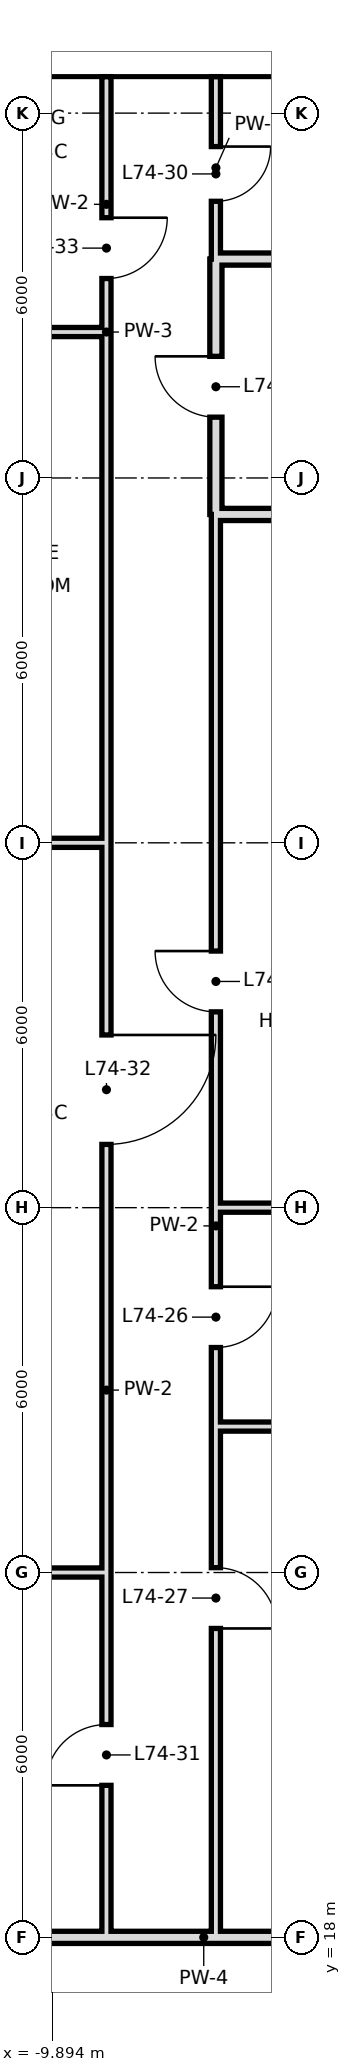
"""IFC4 building model, lengths in metres.
Left out: names, types, materials, properties, quantities, classifications, styles, units other than length and angle.
Written with IfcOpenShell. Run it as: python <this file> out.ifc"""

import sys

from ifc_helpers import new_model, si_unit, direction, frame, frame_2d, origin, place, context, subcontext, project, spatial, rectangle, extrude, element, fill, save


model = new_model("IFC4")
c1 = context("Model", 3, precision=1e-05, world=origin(), true_north=direction((0.0, 1.0)))
c2 = subcontext(c1, "Body", "Model", "MODEL_VIEW")
j1 = project(units=[si_unit("LENGTHUNIT", "METRE"), si_unit("PLANEANGLEUNIT", "RADIAN")], contexts=[c1])
p1 = place(None, origin())
s1 = spatial("IfcSite", under=j1, at=p1, CompositionType="ELEMENT")
p2 = place(p1, origin())
s2 = spatial("IfcBuilding", under=s1, at=p2, CompositionType="ELEMENT")
p3 = place(p2, frame((0.0, 0.0, 312.4)))
s3 = spatial("IfcBuildingStorey", under=s2, at=p3, CompositionType="ELEMENT", Elevation=312.4)
p4 = place(p3, frame((-7.2, 41.4, 0.0), z_axis=(0.0, 0.0, 1.0), x_axis=(0.0, 1.0, 0.0)))
e1 = element("IfcWall", 1, at=p4, inside=s3, PredefinedType="SOLIDWALL", context=c2, shape_type="SweptSolid", body=[
    extrude(rectangle(XDim=4.2, YDim=0.2, at=frame_2d((2.1, 0.0))), origin(), (0.0, 0.0, 1.0), 2.72),
])
p5 = place(p4, frame((1.6, 0.0, 0.0)))
e2 = element("IfcOpeningElement", 2, at=p5, cuts=e1, PredefinedType="OPENING", context=c2, shape_type="SweptSolid", body=[
    extrude(rectangle(XDim=1.0, YDim=2.4, at=frame_2d((0.5, 1.2))), frame((0.0, 0.11, 0.0), z_axis=(0.0, -1.0, 0.0), x_axis=(1.0, 0.0, 0.0)), (0.0, 0.0, 1.0), 0.22),
])
p6 = place(p3, frame((-7.2, 18.0, 0.0), z_axis=(0.0, 0.0, 1.0), x_axis=(0.0, 1.0, 0.0)))
e3 = element("IfcWall", 3, at=p6, inside=s3, PredefinedType="PARTITIONING", context=c2, shape_type="SweptSolid", body=[
    extrude(rectangle(XDim=23.4, YDim=0.15, at=frame_2d((11.7, 0.0))), origin(), (0.0, 0.0, 1.0), 3.42),
])
p7 = place(p6, frame((9.7, 0.0, 0.0)))
e4 = element("IfcOpeningElement", 4, at=p7, cuts=e3, PredefinedType="OPENING", context=c2, shape_type="SweptSolid", body=[
    extrude(rectangle(XDim=1.0, YDim=2.4, at=frame_2d((0.5, 1.2))), frame((0.0, 0.085, 0.0), z_axis=(0.0, -1.0, 0.0), x_axis=(1.0, 0.0, 0.0)), (0.0, 0.0, 1.0), 0.17),
])
p8 = place(p6, frame((5.08, 0.0, 0.0)))
e5 = element("IfcOpeningElement", 5, at=p8, cuts=e3, PredefinedType="OPENING", context=c2, shape_type="SweptSolid", body=[
    extrude(rectangle(XDim=1.0, YDim=2.4, at=frame_2d((0.5, 1.2))), frame((0.0, 0.085, 0.0), z_axis=(0.0, -1.0, 0.0), x_axis=(1.0, 0.0, 0.0)), (0.0, 0.0, 1.0), 0.17),
])
p9 = place(p6, frame((15.22, 0.0, 0.0)))
e6 = element("IfcOpeningElement", 6, at=p9, cuts=e3, PredefinedType="OPENING", context=c2, shape_type="SweptSolid", body=[
    extrude(rectangle(XDim=1.0, YDim=2.4, at=frame_2d((0.5, 1.2))), frame((0.0, 0.085, 0.0), z_axis=(0.0, -1.0, 0.0), x_axis=(1.0, 0.0, 0.0)), (0.0, 0.0, 1.0), 0.17),
])
p10 = place(p3, frame((-7.2, 45.6, 0.0), z_axis=(0.0, 0.0, 1.0), x_axis=(0.0, 1.0, 0.0)))
e7 = element("IfcWall", 7, at=p10, inside=s3, PredefinedType="PARTITIONING", context=c2, shape_type="SweptSolid", body=[
    extrude(rectangle(XDim=3.0, YDim=0.15, at=frame_2d((1.5, 0.0))), origin(), (0.0, 0.0, 1.0), 3.42),
])
p11 = place(p10, frame((0.95, 0.0, 0.0)))
e8 = element("IfcOpeningElement", 8, at=p11, cuts=e7, PredefinedType="OPENING", context=c2, shape_type="SweptSolid", body=[
    extrude(rectangle(XDim=0.9, YDim=2.4, at=frame_2d((0.45, 1.2))), frame((0.0, 0.085, 0.0), z_axis=(0.0, -1.0, 0.0), x_axis=(1.0, 0.0, 0.0)), (0.0, 0.0, 1.0), 0.17),
])
p12 = place(p3, frame((-9.0, 18.0, 0.0), z_axis=(0.0, 0.0, 1.0), x_axis=(0.0, 1.0, 0.0)))
e9 = element("IfcWall", 9, at=p12, inside=s3, PredefinedType="PARTITIONING", context=c2, shape_type="SweptSolid", body=[
    extrude(rectangle(XDim=18.0, YDim=0.15, at=frame_2d((9.0, 0.0))), origin(), (0.0, 0.0, 1.0), 3.42),
])
p13 = place(p12, frame((2.5, 0.0, 0.0)))
e10 = element("IfcOpeningElement", 10, at=p13, cuts=e9, PredefinedType="OPENING", context=c2, shape_type="SweptSolid", body=[
    extrude(rectangle(XDim=1.0, YDim=2.4, at=frame_2d((0.5, 1.2))), frame((0.0, 0.085, 0.0), z_axis=(0.0, -1.0, 0.0), x_axis=(1.0, 0.0, 0.0)), (0.0, 0.0, 1.0), 0.17),
])
p14 = place(p12, frame((13.04, 0.0, 0.0)))
e11 = element("IfcOpeningElement", 11, at=p14, cuts=e9, PredefinedType="OPENING", context=c2, shape_type="SweptSolid", body=[
    extrude(rectangle(XDim=1.8, YDim=2.4, at=frame_2d((0.9, 1.2))), frame((0.0, 0.085, 0.0), z_axis=(0.0, -1.0, 0.0), x_axis=(1.0, 0.0, 0.0)), (0.0, 0.0, 1.0), 0.17),
])
p15 = place(p3, frame((-9.0, 44.4, 0.0), z_axis=(0.0, 0.0, 1.0), x_axis=(0.0, 1.0, 0.0)))
e12 = element("IfcWall", 12, at=p15, inside=s3, PredefinedType="PARTITIONING", context=c2, shape_type="SweptSolid", body=[
    extrude(rectangle(XDim=4.2, YDim=0.15, at=frame_2d((2.1, 0.0))), origin(), (0.0, 0.0, 1.0), 3.42),
])
p16 = place(p15, frame((0.88, 0.0, 0.0)))
e13 = element("IfcOpeningElement", 13, at=p16, cuts=e12, PredefinedType="OPENING", context=c2, shape_type="SweptSolid", body=[
    extrude(rectangle(XDim=1.0, YDim=2.4, at=frame_2d((0.5, 1.2))), frame((0.0, 0.085, 0.0), z_axis=(0.0, -1.0, 0.0), x_axis=(1.0, 0.0, 0.0)), (0.0, 0.0, 1.0), 0.17),
])
p17 = place(p3, frame((-9.0, 36.0, 0.0), z_axis=(0.0, 0.0, 1.0), x_axis=(0.0, 1.0, 0.0)))
e14 = element("IfcWall", 14, at=p17, inside=s3, PredefinedType="PARTITIONING", context=c2, shape_type="SweptSolid", body=[
    extrude(rectangle(XDim=8.4, YDim=0.15, at=frame_2d((4.2, 0.0))), origin(), (0.0, 0.0, 1.0), 3.42),
])
p18 = place(p3, frame((-18.6, 18.0, 0.0), z_axis=(0.0, 0.0, 1.0), x_axis=(1.0, 0.0, 0.0)))
e15 = element("IfcWall", 15, at=p18, inside=s3, PredefinedType="SOLIDWALL", context=c2, shape_type="SweptSolid", body=[
    extrude(rectangle(XDim=21.7, YDim=0.2, at=frame_2d((10.85, 0.0))), origin(), (0.0, 0.0, 1.0), 2.72),
])
p19 = place(p3, frame((-18.0, 24.0, 0.0), z_axis=(0.0, 0.0, 1.0), x_axis=(1.0, 0.0, 0.0)))
e16 = element("IfcWall", 16, at=p19, inside=s3, PredefinedType="PARTITIONING", context=c2, shape_type="SweptSolid", body=[
    extrude(rectangle(XDim=9.0, YDim=0.15, at=frame_2d((4.5, 0.0))), origin(), (0.0, 0.0, 1.0), 2.72),
])
p20 = place(p3, frame((-7.2, 26.4, 0.0), z_axis=(0.0, 0.0, 1.0), x_axis=(1.0, 0.0, 0.0)))
e17 = element("IfcWall", 17, at=p20, inside=s3, PredefinedType="PARTITIONING", context=c2, shape_type="SweptSolid", body=[
    extrude(rectangle(XDim=10.3, YDim=0.15, at=frame_2d((5.15, 0.0))), origin(), (0.0, 0.0, 1.0), 3.42),
])
p21 = place(p3, frame((-7.2, 30.0, 0.0), z_axis=(0.0, 0.0, 1.0), x_axis=(1.0, 0.0, 0.0)))
e18 = element("IfcWall", 18, at=p21, inside=s3, PredefinedType="PARTITIONING", context=c2, shape_type="SweptSolid", body=[
    extrude(rectangle(XDim=10.3, YDim=0.15, at=frame_2d((5.15, 0.0))), origin(), (0.0, 0.0, 1.0), 2.72),
])
p22 = place(p3, frame((-12.0, 36.0, 0.0), z_axis=(0.0, 0.0, 1.0), x_axis=(1.0, 0.0, 0.0)))
e19 = element("IfcWall", 19, at=p22, inside=s3, PredefinedType="PARTITIONING", context=c2, shape_type="SweptSolid", body=[
    extrude(rectangle(XDim=3.0, YDim=0.15, at=frame_2d((1.5, 0.0))), origin(), (0.0, 0.0, 1.0), 2.72),
])
p23 = place(p3, frame((-7.2, 41.4, 0.0), z_axis=(0.0, 0.0, 1.0), x_axis=(1.0, 0.0, 0.0)))
e20 = element("IfcWall", 20, at=p23, inside=s3, PredefinedType="SOLIDWALL", context=c2, shape_type="SweptSolid", body=[
    extrude(rectangle(XDim=10.3, YDim=0.2, at=frame_2d((5.15, 0.0))), origin(), (0.0, 0.0, 1.0), 2.72),
])
p24 = place(p3, frame((-12.0, 44.4, 0.0), z_axis=(0.0, 0.0, 1.0), x_axis=(1.0, 0.0, 0.0)))
e21 = element("IfcWall", 21, at=p24, inside=s3, PredefinedType="PARTITIONING", context=c2, shape_type="SweptSolid", body=[
    extrude(rectangle(XDim=3.0, YDim=0.15, at=frame_2d((1.5, 0.0))), origin(), (0.0, 0.0, 1.0), 3.42),
])
p25 = place(p3, frame((-7.2, 45.6, 0.0), z_axis=(0.0, 0.0, 1.0), x_axis=(1.0, 0.0, 0.0)))
e22 = element("IfcWall", 22, at=p25, inside=s3, PredefinedType="SOLIDWALL", context=c2, shape_type="SweptSolid", body=[
    extrude(rectangle(XDim=10.3, YDim=0.2, at=frame_2d((5.15, 0.0))), origin(), (0.0, 0.0, 1.0), 2.72),
])
p26 = place(p7, origin())
e23 = element("IfcDoor", 23, at=p26, inside=s3, OperationType="SINGLE_SWING_RIGHT", PredefinedType="DOOR", context=c2, shape_type="SweptSolid", body=[
    extrude(rectangle(XDim=1.0, YDim=2.4, at=frame_2d((0.5, 1.2))), frame((0.0, 0.025, 0.0), z_axis=(0.0, -1.0, 0.0), x_axis=(1.0, 0.0, 0.0)), (0.0, 0.0, 1.0), 0.05),
])
fill(e4, e23)
p27 = place(p8, frame((1.0, 0.0, 0.0), z_axis=(0.0, 0.0, 1.0), x_axis=(-1.0, 0.0, 0.0)))
e24 = element("IfcDoor", 24, at=p27, inside=s3, OperationType="SINGLE_SWING_RIGHT", PredefinedType="DOOR", context=c2, shape_type="SweptSolid", body=[
    extrude(rectangle(XDim=1.0, YDim=2.4, at=frame_2d((0.5, 1.2))), frame((0.0, 0.025, 0.0), z_axis=(0.0, -1.0, 0.0), x_axis=(1.0, 0.0, 0.0)), (0.0, 0.0, 1.0), 0.05),
])
fill(e5, e24)
p28 = place(p9, frame((1.0, 0.0, 0.0), z_axis=(0.0, 0.0, 1.0), x_axis=(-1.0, 0.0, 0.0)))
e25 = element("IfcDoor", 25, at=p28, inside=s3, OperationType="SINGLE_SWING_LEFT", PredefinedType="DOOR", context=c2, shape_type="SweptSolid", body=[
    extrude(rectangle(XDim=1.0, YDim=2.4, at=frame_2d((0.5, 1.2))), frame((0.0, 0.025, 0.0), z_axis=(0.0, -1.0, 0.0), x_axis=(1.0, 0.0, 0.0)), (0.0, 0.0, 1.0), 0.05),
])
fill(e6, e25)
p29 = place(p5, frame((1.0, 0.0, 0.0), z_axis=(0.0, 0.0, 1.0), x_axis=(-1.0, 0.0, 0.0)))
e26 = element("IfcDoor", 26, at=p29, inside=s3, OperationType="SINGLE_SWING_LEFT", PredefinedType="DOOR", context=c2, shape_type="SweptSolid", body=[
    extrude(rectangle(XDim=1.0, YDim=2.4, at=frame_2d((0.5, 1.2))), frame((0.0, 0.025, 0.0), z_axis=(0.0, -1.0, 0.0), x_axis=(1.0, 0.0, 0.0)), (0.0, 0.0, 1.0), 0.05),
])
fill(e2, e26)
p30 = place(p11, origin())
e27 = element("IfcDoor", 27, at=p30, inside=s3, OperationType="SINGLE_SWING_RIGHT", PredefinedType="DOOR", context=c2, shape_type="SweptSolid", body=[
    extrude(rectangle(XDim=0.9, YDim=2.4, at=frame_2d((0.45, 1.2))), frame((0.0, 0.025, 0.0), z_axis=(0.0, -1.0, 0.0), x_axis=(1.0, 0.0, 0.0)), (0.0, 0.0, 1.0), 0.05),
])
fill(e8, e27)
p31 = place(p13, origin())
e28 = element("IfcDoor", 28, at=p31, inside=s3, OperationType="SINGLE_SWING_LEFT", PredefinedType="DOOR", context=c2, shape_type="SweptSolid", body=[
    extrude(rectangle(XDim=1.0, YDim=2.4, at=frame_2d((0.5, 1.2))), frame((0.0, 0.025, 0.0), z_axis=(0.0, -1.0, 0.0), x_axis=(1.0, 0.0, 0.0)), (0.0, 0.0, 1.0), 0.05),
])
fill(e10, e28)
p32 = place(p14, origin())
e29 = element("IfcDoor", 29, at=p32, inside=s3, OperationType="SINGLE_SWING_RIGHT", PredefinedType="DOOR", context=c2, shape_type="SweptSolid", body=[
    extrude(rectangle(XDim=1.8, YDim=2.4, at=frame_2d((0.9, 1.2))), frame((0.0, 0.025, 0.0), z_axis=(0.0, -1.0, 0.0), x_axis=(1.0, 0.0, 0.0)), (0.0, 0.0, 1.0), 0.05),
])
fill(e11, e29)
p33 = place(p16, origin())
e30 = element("IfcDoor", 30, at=p33, inside=s3, OperationType="SINGLE_SWING_RIGHT", PredefinedType="DOOR", context=c2, shape_type="SweptSolid", body=[
    extrude(rectangle(XDim=1.0, YDim=2.4, at=frame_2d((0.5, 1.2))), frame((0.0, 0.025, 0.0), z_axis=(0.0, -1.0, 0.0), x_axis=(1.0, 0.0, 0.0)), (0.0, 0.0, 1.0), 0.05),
])
fill(e13, e30)
save(model, sys.argv[1])
